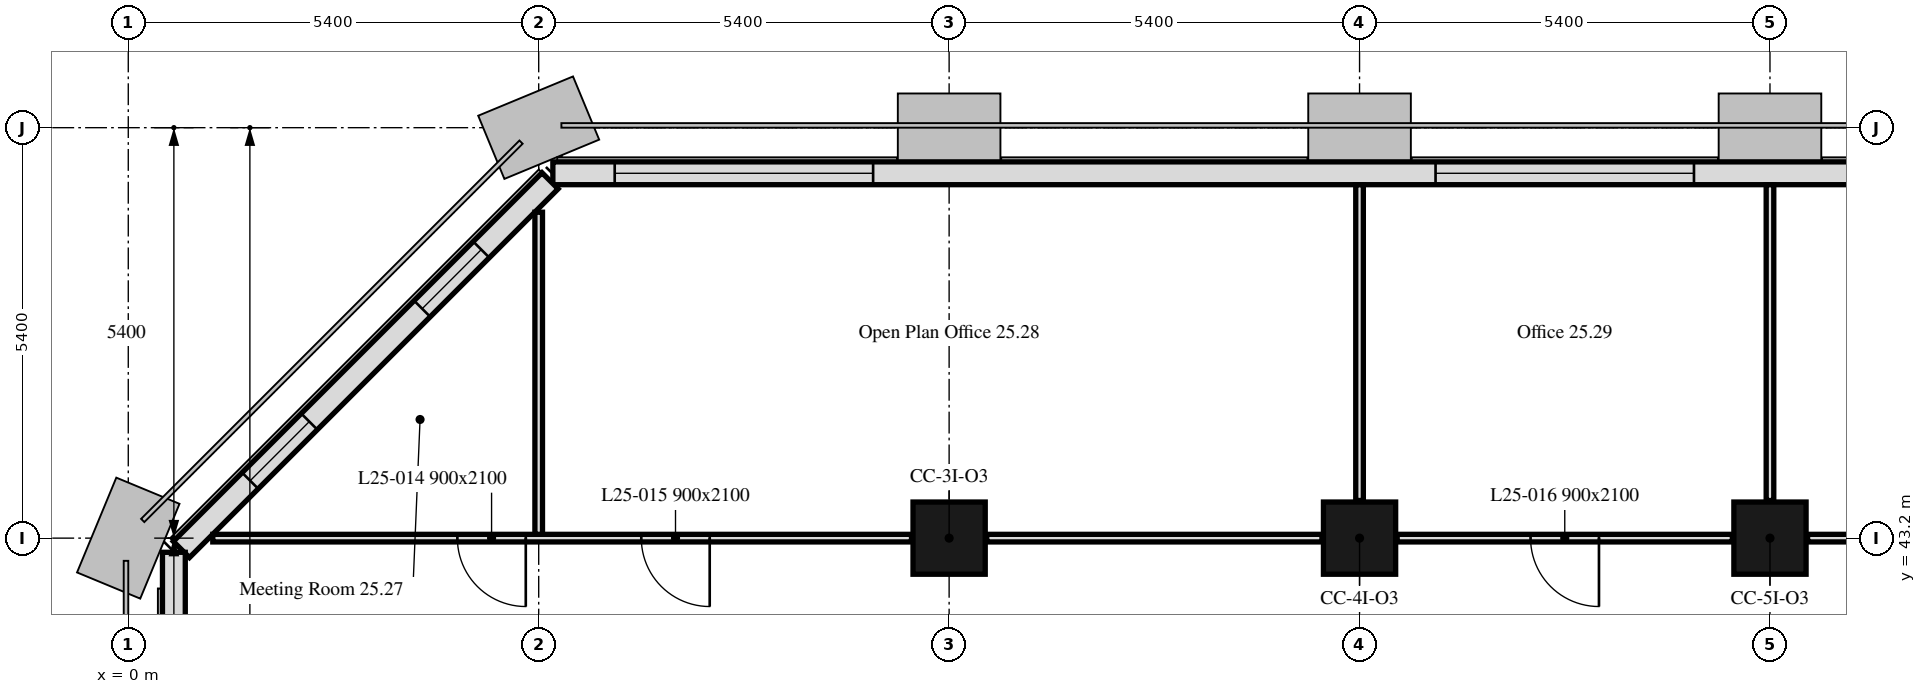
"""IFC4 building model, lengths in metres.
Left out: names, types, materials, properties, quantities, classifications, styles, units other than length and angle.
Written with IfcOpenShell. Run it as: python <this file> out.ifc"""

import sys

from ifc_helpers import new_model, si_unit, direction, frame, frame_2d, origin, origin_2d, place, context, subcontext, project, spatial, rectangle, extrude, element, fill, save


model = new_model("IFC4")
c1 = context("Model", 3, precision=1e-05, world=origin(), true_north=direction((0.0, 1.0)))
c2 = subcontext(c1, "Body", "Model", "MODEL_VIEW")
j1 = project(units=[si_unit("LENGTHUNIT", "METRE"), si_unit("PLANEANGLEUNIT", "RADIAN")], contexts=[c1])
p1 = place(None, origin())
s1 = spatial("IfcSite", under=j1, at=p1, CompositionType="ELEMENT")
p2 = place(p1, origin())
s2 = spatial("IfcBuilding", under=s1, at=p2, CompositionType="ELEMENT")
p3 = place(p2, frame((0.0, 0.0, 106.8)))
s3 = spatial("IfcBuildingStorey", under=s2, at=p3, CompositionType="ELEMENT", Elevation=106.8)
for number, where, z_axis, x_axis in (
    (1, (10.8, 43.2, 0.0), (0.0, 0.0, 1.0), (1.0, 0.0, 0.0)),
    (2, (16.2, 43.2, 0.0), (0.0, 0.0, 1.0), (1.0, 0.0, 0.0)),
    (3, (21.6, 43.2, 0.0), (0.0, 0.0, 1.0), (1.0, 0.0, 0.0)),
):
    element("IfcColumn", number, at=place(p3, frame(where, z_axis=z_axis, x_axis=x_axis)), inside=s3, PredefinedType="COLUMN", context=c2, shape_type="SweptSolid", body=[
        extrude(rectangle(XDim=0.95, YDim=0.95, at=origin_2d()), origin(), (0.0, 0.0, 1.0), 3.5),
    ])
p4 = place(p3, frame((37.614, 48.0, 0.0), z_axis=(0.0, 0.0, 1.0), x_axis=(-1.0, 0.0, 0.0)))
e4 = element("IfcWall", 4, at=p4, inside=s3, PredefinedType="SOLIDWALL", context=c2, shape_type="SweptSolid", body=[
    extrude(rectangle(XDim=32.027, YDim=0.3, at=frame_2d((16.014, 0.0))), origin(), (0.0, 0.0, 1.0), 3.5),
])
p5 = place(p4, frame((6.214, 0.0, 0.9)))
e5 = element("IfcOpeningElement", 5, at=p5, cuts=e4, PredefinedType="OPENING", context=c2, shape_type="SweptSolid", body=[
    extrude(rectangle(XDim=3.4, YDim=1.7, at=frame_2d((1.7, 0.85))), frame((0.0, 0.16, 0.0), z_axis=(0.0, -1.0, 0.0), x_axis=(1.0, 0.0, 0.0)), (0.0, 0.0, 1.0), 0.32),
])
p6 = place(p4, frame((17.014, 0.0, 0.9)))
e6 = element("IfcOpeningElement", 6, at=p6, cuts=e4, PredefinedType="OPENING", context=c2, shape_type="SweptSolid", body=[
    extrude(rectangle(XDim=3.4, YDim=1.7, at=frame_2d((1.7, 0.85))), frame((0.0, 0.16, 0.0), z_axis=(0.0, -1.0, 0.0), x_axis=(1.0, 0.0, 0.0)), (0.0, 0.0, 1.0), 0.32),
])
p7 = place(p4, frame((27.814, 0.0, 0.9)))
e7 = element("IfcOpeningElement", 7, at=p7, cuts=e4, PredefinedType="OPENING", context=c2, shape_type="SweptSolid", body=[
    extrude(rectangle(XDim=3.4, YDim=1.7, at=frame_2d((1.7, 0.85))), frame((0.0, 0.16, 0.0), z_axis=(0.0, -1.0, 0.0), x_axis=(1.0, 0.0, 0.0)), (0.0, 0.0, 1.0), 0.32),
])
p8 = place(p3, frame((5.55, 47.901, 0.0), z_axis=(0.0, 0.0, 1.0), x_axis=(-0.707106781187, -0.707106781187, 0.0)))
e8 = element("IfcWall", 8, at=p8, inside=s3, PredefinedType="SOLIDWALL", context=c2, shape_type="SweptSolid", body=[
    extrude(rectangle(XDim=6.86, YDim=0.3, at=frame_2d((3.43, 0.0))), origin(), (0.0, 0.0, 1.0), 3.5),
])
p9 = place(p8, frame((1.28, 0.0, 0.9)))
e9 = element("IfcOpeningElement", 9, at=p9, cuts=e8, PredefinedType="OPENING", context=c2, shape_type="SweptSolid", body=[
    extrude(rectangle(XDim=1.1, YDim=1.7, at=frame_2d((0.55, 0.85))), frame((0.0, 0.16, 0.0), z_axis=(0.0, -1.0, 0.0), x_axis=(1.0, 0.0, 0.0)), (0.0, 0.0, 1.0), 0.32),
])
p10 = place(p8, frame((4.48, 0.0, 0.9)))
e10 = element("IfcOpeningElement", 10, at=p10, cuts=e8, PredefinedType="OPENING", context=c2, shape_type="SweptSolid", body=[
    extrude(rectangle(XDim=1.1, YDim=1.7, at=frame_2d((0.55, 0.85))), frame((0.0, 0.16, 0.0), z_axis=(0.0, -1.0, 0.0), x_axis=(1.0, 0.0, 0.0)), (0.0, 0.0, 1.0), 0.32),
])
p11 = place(p3, frame((0.6, 43.014, 0.0), z_axis=(0.0, 0.0, 1.0), x_axis=(0.0, -1.0, 0.0)))
e11 = element("IfcWall", 11, at=p11, inside=s3, PredefinedType="SOLIDWALL", context=c2, shape_type="SweptSolid", body=[
    extrude(rectangle(XDim=32.027, YDim=0.3, at=frame_2d((16.014, 0.0))), origin(), (0.0, 0.0, 1.0), 3.5),
])
p12 = place(p11, frame((6.564, 0.0, 0.9)))
e12 = element("IfcOpeningElement", 12, at=p12, cuts=e11, PredefinedType="OPENING", context=c2, shape_type="SweptSolid", body=[
    extrude(rectangle(XDim=1.1, YDim=1.7, at=frame_2d((0.55, 0.85))), frame((0.0, 0.16, 0.0), z_axis=(0.0, -1.0, 0.0), x_axis=(1.0, 0.0, 0.0)), (0.0, 0.0, 1.0), 0.32),
])
p13 = place(p11, frame((8.164, 0.0, 0.9)))
e13 = element("IfcOpeningElement", 13, at=p13, cuts=e11, PredefinedType="OPENING", context=c2, shape_type="SweptSolid", body=[
    extrude(rectangle(XDim=1.1, YDim=1.7, at=frame_2d((0.55, 0.85))), frame((0.0, 0.16, 0.0), z_axis=(0.0, -1.0, 0.0), x_axis=(1.0, 0.0, 0.0)), (0.0, 0.0, 1.0), 0.32),
])
p14 = place(p11, frame((17.014, 0.0, 0.9)))
e14 = element("IfcOpeningElement", 14, at=p14, cuts=e11, PredefinedType="OPENING", context=c2, shape_type="SweptSolid", body=[
    extrude(rectangle(XDim=3.4, YDim=1.7, at=frame_2d((1.7, 0.85))), frame((0.0, 0.16, 0.0), z_axis=(0.0, -1.0, 0.0), x_axis=(1.0, 0.0, 0.0)), (0.0, 0.0, 1.0), 0.32),
])
p15 = place(p11, frame((28.164, 0.0, 0.9)))
e15 = element("IfcOpeningElement", 15, at=p15, cuts=e11, PredefinedType="OPENING", context=c2, shape_type="SweptSolid", body=[
    extrude(rectangle(XDim=1.1, YDim=1.7, at=frame_2d((0.55, 0.85))), frame((0.0, 0.16, 0.0), z_axis=(0.0, -1.0, 0.0), x_axis=(1.0, 0.0, 0.0)), (0.0, 0.0, 1.0), 0.32),
])
p16 = place(p11, frame((29.764, 0.0, 0.9)))
e16 = element("IfcOpeningElement", 16, at=p16, cuts=e11, PredefinedType="OPENING", context=c2, shape_type="SweptSolid", body=[
    extrude(rectangle(XDim=1.1, YDim=1.7, at=frame_2d((0.55, 0.85))), frame((0.0, 0.16, 0.0), z_axis=(0.0, -1.0, 0.0), x_axis=(1.0, 0.0, 0.0)), (0.0, 0.0, 1.0), 0.32),
])
p17 = place(p3, frame((26.505, 43.2, 0.0), z_axis=(0.0, 0.0, 1.0), x_axis=(-1.0, 0.0, 0.0)))
e17 = element("IfcWall", 17, at=p17, inside=s3, PredefinedType="PARTITIONING", context=c2, shape_type="SweptSolid", body=[
    extrude(rectangle(XDim=4.41, YDim=0.1, at=frame_2d((2.205, 0.0))), origin(), (0.0, 0.0, 1.0), 3.5),
])
p18 = place(p17, frame((1.755, 0.0, 0.0)))
e18 = element("IfcOpeningElement", 18, at=p18, cuts=e17, PredefinedType="OPENING", context=c2, shape_type="SweptSolid", body=[
    extrude(rectangle(XDim=0.9, YDim=2.1, at=frame_2d((0.45, 1.05))), frame((0.0, 0.05, 0.0), z_axis=(0.0, -1.0, 0.0), x_axis=(1.0, 0.0, 0.0)), (0.0, 0.0, 1.0), 0.1),
])
p19 = place(p3, frame((21.105, 43.2, 0.0), z_axis=(0.0, 0.0, 1.0), x_axis=(-1.0, 0.0, 0.0)))
e19 = element("IfcWall", 19, at=p19, inside=s3, PredefinedType="PARTITIONING", context=c2, shape_type="SweptSolid", body=[
    extrude(rectangle(XDim=4.41, YDim=0.1, at=frame_2d((2.205, 0.0))), origin(), (0.0, 0.0, 1.0), 3.5),
])
p20 = place(p19, frame((1.755, 0.0, 0.0)))
e20 = element("IfcOpeningElement", 20, at=p20, cuts=e19, PredefinedType="OPENING", context=c2, shape_type="SweptSolid", body=[
    extrude(rectangle(XDim=0.9, YDim=2.1, at=frame_2d((0.45, 1.05))), frame((0.0, 0.05, 0.0), z_axis=(0.0, -1.0, 0.0), x_axis=(1.0, 0.0, 0.0)), (0.0, 0.0, 1.0), 0.1),
])
p21 = place(p3, frame((15.705, 43.2, 0.0), z_axis=(0.0, 0.0, 1.0), x_axis=(-1.0, 0.0, 0.0)))
e21 = element("IfcWall", 21, at=p21, inside=s3, PredefinedType="PARTITIONING", context=c2, shape_type="SweptSolid", body=[
    extrude(rectangle(XDim=4.41, YDim=0.1, at=frame_2d((2.205, 0.0))), origin(), (0.0, 0.0, 1.0), 3.5),
])
p22 = place(p3, frame((10.305, 43.2, 0.0), z_axis=(0.0, 0.0, 1.0), x_axis=(-1.0, 0.0, 0.0)))
e22 = element("IfcWall", 22, at=p22, inside=s3, PredefinedType="PARTITIONING", context=c2, shape_type="SweptSolid", body=[
    extrude(rectangle(XDim=9.193, YDim=0.1, at=frame_2d((4.596, 0.0))), origin(), (0.0, 0.0, 1.0), 3.5),
])
p23 = place(p22, frame((5.075, 0.0, 0.0)))
e23 = element("IfcOpeningElement", 23, at=p23, cuts=e22, PredefinedType="OPENING", context=c2, shape_type="SweptSolid", body=[
    extrude(rectangle(XDim=0.9, YDim=2.1, at=frame_2d((0.45, 1.05))), frame((0.0, 0.05, 0.0), z_axis=(0.0, -1.0, 0.0), x_axis=(1.0, 0.0, 0.0)), (0.0, 0.0, 1.0), 0.1),
])
p24 = place(p22, frame((2.655, 0.0, 0.0)))
e24 = element("IfcOpeningElement", 24, at=p24, cuts=e22, PredefinedType="OPENING", context=c2, shape_type="SweptSolid", body=[
    extrude(rectangle(XDim=0.9, YDim=2.1, at=frame_2d((0.45, 1.05))), frame((0.0, 0.05, 0.0), z_axis=(0.0, -1.0, 0.0), x_axis=(1.0, 0.0, 0.0)), (0.0, 0.0, 1.0), 0.1),
])
p25 = place(p3, frame((5.4, 43.25, 0.0), z_axis=(0.0, 0.0, 1.0), x_axis=(0.0, 1.0, 0.0)))
e25 = element("IfcWall", 25, at=p25, inside=s3, PredefinedType="PARTITIONING", context=c2, shape_type="SweptSolid", body=[
    extrude(rectangle(XDim=4.238, YDim=0.1, at=frame_2d((2.119, 0.0))), origin(), (0.0, 0.0, 1.0), 3.5),
])
for number, where, z_axis, x_axis in (
    (26, (16.2, 43.695, 0.0), (0.0, 0.0, 1.0), (0.0, 1.0, 0.0)),
    (27, (21.6, 43.695, 0.0), (0.0, 0.0, 1.0), (0.0, 1.0, 0.0)),
):
    element("IfcWall", number, at=place(p3, frame(where, z_axis=z_axis, x_axis=x_axis)), inside=s3, PredefinedType="PARTITIONING", context=c2, shape_type="SweptSolid", body=[
        extrude(rectangle(XDim=4.154, YDim=0.1, at=frame_2d((2.077, 0.0))), origin(), (0.0, 0.0, 1.0), 2.75),
    ])
p26 = place(p6, origin())
e28 = element("IfcWindow", 28, at=p26, inside=s3, PartitioningType="SINGLE_PANEL", PredefinedType="WINDOW", context=c2, shape_type="SweptSolid", body=[
    extrude(rectangle(XDim=3.4, YDim=1.7, at=frame_2d((1.7, 0.85))), frame((0.0, 0.03, 0.0), z_axis=(0.0, -1.0, 0.0), x_axis=(1.0, 0.0, 0.0)), (0.0, 0.0, 1.0), 0.06),
])
fill(e6, e28)
p27 = place(p7, origin())
e29 = element("IfcWindow", 29, at=p27, inside=s3, PartitioningType="SINGLE_PANEL", PredefinedType="WINDOW", context=c2, shape_type="SweptSolid", body=[
    extrude(rectangle(XDim=3.4, YDim=1.7, at=frame_2d((1.7, 0.85))), frame((0.0, 0.03, 0.0), z_axis=(0.0, -1.0, 0.0), x_axis=(1.0, 0.0, 0.0)), (0.0, 0.0, 1.0), 0.06),
])
fill(e7, e29)
p28 = place(p9, origin())
e30 = element("IfcWindow", 30, at=p28, inside=s3, PartitioningType="SINGLE_PANEL", PredefinedType="WINDOW", context=c2, shape_type="SweptSolid", body=[
    extrude(rectangle(XDim=1.1, YDim=1.7, at=frame_2d((0.55, 0.85))), frame((0.0, 0.03, 0.0), z_axis=(0.0, -1.0, 0.0), x_axis=(1.0, 0.0, 0.0)), (0.0, 0.0, 1.0), 0.06),
])
fill(e9, e30)
p29 = place(p10, origin())
e31 = element("IfcWindow", 31, at=p29, inside=s3, PartitioningType="SINGLE_PANEL", PredefinedType="WINDOW", context=c2, shape_type="SweptSolid", body=[
    extrude(rectangle(XDim=1.1, YDim=1.7, at=frame_2d((0.55, 0.85))), frame((0.0, 0.03, 0.0), z_axis=(0.0, -1.0, 0.0), x_axis=(1.0, 0.0, 0.0)), (0.0, 0.0, 1.0), 0.06),
])
fill(e10, e31)
p30 = place(p23, origin())
e32 = element("IfcDoor", 32, at=p30, inside=s3, OperationType="SINGLE_SWING_LEFT", PredefinedType="DOOR", context=c2, shape_type="SweptSolid", body=[
    extrude(rectangle(XDim=0.9, YDim=2.1, at=frame_2d((0.45, 1.05))), frame((0.0, 0.025, 0.0), z_axis=(0.0, -1.0, 0.0), x_axis=(1.0, 0.0, 0.0)), (0.0, 0.0, 1.0), 0.05),
])
fill(e23, e32)
p31 = place(p24, origin())
e33 = element("IfcDoor", 33, at=p31, inside=s3, OperationType="SINGLE_SWING_LEFT", PredefinedType="DOOR", context=c2, shape_type="SweptSolid", body=[
    extrude(rectangle(XDim=0.9, YDim=2.1, at=frame_2d((0.45, 1.05))), frame((0.0, 0.025, 0.0), z_axis=(0.0, -1.0, 0.0), x_axis=(1.0, 0.0, 0.0)), (0.0, 0.0, 1.0), 0.05),
])
fill(e24, e33)
p32 = place(p20, origin())
e34 = element("IfcDoor", 34, at=p32, inside=s3, OperationType="SINGLE_SWING_LEFT", PredefinedType="DOOR", context=c2, shape_type="SweptSolid", body=[
    extrude(rectangle(XDim=0.9, YDim=2.1, at=frame_2d((0.45, 1.05))), frame((0.0, 0.025, 0.0), z_axis=(0.0, -1.0, 0.0), x_axis=(1.0, 0.0, 0.0)), (0.0, 0.0, 1.0), 0.05),
])
fill(e20, e34)
save(model, sys.argv[1])
